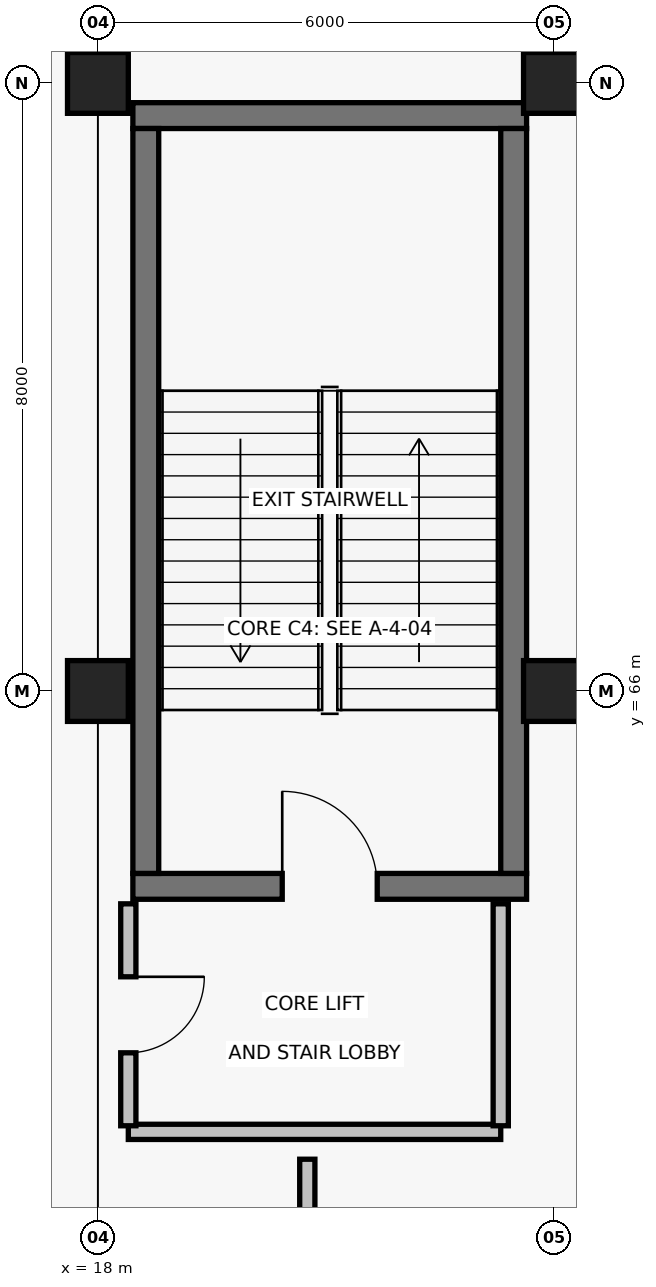
"""IFC4 building model, lengths in metres.
Left out: names, types, materials, properties, quantities, classifications, styles, units other than length and angle.
Written with IfcOpenShell. Run it as: python <this file> out.ifc"""

import sys

from ifc_helpers import new_model, si_unit, direction, frame, frame_2d, origin, origin_2d, place, context, subcontext, project, spatial, rectangle, extrude, element, fill, save


model = new_model("IFC4")
c1 = context("Model", 3, precision=1e-05, world=origin(), true_north=direction((0.0, 1.0)))
c2 = subcontext(c1, "Body", "Model", "MODEL_VIEW")
j1 = project(units=[si_unit("LENGTHUNIT", "METRE"), si_unit("PLANEANGLEUNIT", "RADIAN")], contexts=[c1])
p1 = place(None, origin())
s1 = spatial("IfcSite", under=j1, at=p1, CompositionType="ELEMENT")
p2 = place(p1, origin())
s2 = spatial("IfcBuilding", under=s1, at=p2, CompositionType="ELEMENT")
p3 = place(p2, frame((0.0, 0.0, -10.4)))
s3 = spatial("IfcBuildingStorey", under=s2, at=p3, CompositionType="ELEMENT", Elevation=-10.4)
for number, where, z_axis, x_axis in (
    (1, (18.0, 66.0, 0.0), (0.0, 0.0, 1.0), (1.0, 0.0, 0.0)),
    (2, (18.0, 74.0, 0.0), (0.0, 0.0, 1.0), (1.0, 0.0, 0.0)),
    (3, (24.0, 66.0, 0.0), (0.0, 0.0, 1.0), (1.0, 0.0, 0.0)),
    (4, (24.0, 74.0, 0.0), (0.0, 0.0, 1.0), (1.0, 0.0, 0.0)),
):
    element("IfcColumn", number, at=place(p3, frame(where, z_axis=z_axis, x_axis=x_axis)), inside=s3, PredefinedType="COLUMN", context=c2, shape_type="SweptSolid", body=[
        extrude(rectangle(XDim=0.8, YDim=0.8, at=origin_2d()), origin(), (0.0, 0.0, 1.0), 5.6),
    ])
p4 = place(p3, frame((18.46, 63.43, 0.0), z_axis=(0.0, 0.0, 1.0), x_axis=(1.0, 0.0, 0.0)))
e5 = element("IfcWall", 5, at=p4, inside=s3, PredefinedType="SHEAR", context=c2, shape_type="SweptSolid", body=[
    extrude(rectangle(XDim=5.18, YDim=0.34, at=frame_2d((2.59, 0.0))), origin(), (0.0, 0.0, 1.0), 5.15),
])
p5 = place(p4, frame((1.965, 0.0, 0.0)))
e6 = element("IfcOpeningElement", 6, at=p5, cuts=e5, PredefinedType="OPENING", context=c2, shape_type="SweptSolid", body=[
    extrude(rectangle(XDim=1.25, YDim=2.2, at=frame_2d((0.625, 1.1))), frame((0.0, 0.185, 0.0), z_axis=(0.0, -1.0, 0.0), x_axis=(1.0, 0.0, 0.0)), (0.0, 0.0, 1.0), 0.37),
])
p6 = place(p3, frame((23.64, 73.57, 0.0), z_axis=(0.0, 0.0, 1.0), x_axis=(-1.0, 0.0, 0.0)))
e7 = element("IfcWall", 7, at=p6, inside=s3, PredefinedType="SHEAR", context=c2, shape_type="SweptSolid", body=[
    extrude(rectangle(XDim=5.18, YDim=0.34, at=frame_2d((2.59, 0.0))), origin(), (0.0, 0.0, 1.0), 5.15),
])
for number, where, z_axis, x_axis in (
    (8, (18.63, 73.4, 0.0), (0.0, 0.0, 1.0), (0.0, -1.0, 0.0)),
    (9, (23.47, 63.6, 0.0), (0.0, 0.0, 1.0), (0.0, 1.0, 0.0)),
):
    element("IfcWall", number, at=place(p3, frame(where, z_axis=z_axis, x_axis=x_axis)), inside=s3, PredefinedType="SHEAR", context=c2, shape_type="SweptSolid", body=[
        extrude(rectangle(XDim=9.8, YDim=0.34, at=frame_2d((4.9, 0.0))), origin(), (0.0, 0.0, 1.0), 5.15),
    ])
p7 = place(p3, frame((18.4, 60.2, 0.0), z_axis=(0.0, 0.0, 1.0), x_axis=(1.0, 0.0, 0.0)))
e10 = element("IfcWall", 10, at=p7, inside=s3, PredefinedType="PARTITIONING", context=c2, shape_type="SweptSolid", body=[
    extrude(rectangle(XDim=4.9, YDim=0.2, at=frame_2d((2.45, 0.0))), origin(), (0.0, 0.0, 1.0), 4.68),
])
p8 = place(p3, frame((18.4, 63.2, 0.0), z_axis=(0.0, 0.0, 1.0), x_axis=(0.0, -1.0, 0.0)))
e11 = element("IfcWall", 11, at=p8, inside=s3, PredefinedType="PARTITIONING", context=c2, shape_type="SweptSolid", body=[
    extrude(rectangle(XDim=2.92, YDim=0.2, at=frame_2d((1.46, 0.0))), origin(), (0.0, 0.0, 1.0), 4.68),
])
p9 = place(p8, frame((0.96, 0.0, 0.0)))
e12 = element("IfcOpeningElement", 12, at=p9, cuts=e11, PredefinedType="OPENING", context=c2, shape_type="SweptSolid", body=[
    extrude(rectangle(XDim=1.0, YDim=2.15, at=frame_2d((0.5, 1.075))), frame((0.0, 0.115, 0.0), z_axis=(0.0, -1.0, 0.0), x_axis=(1.0, 0.0, 0.0)), (0.0, 0.0, 1.0), 0.23),
])
p10 = place(p3, frame((23.3, 60.28, 0.0), z_axis=(0.0, 0.0, 1.0), x_axis=(0.0, 1.0, 0.0)))
e13 = element("IfcWall", 13, at=p10, inside=s3, PredefinedType="PARTITIONING", context=c2, shape_type="SweptSolid", body=[
    extrude(rectangle(XDim=2.92, YDim=0.2, at=frame_2d((1.46, 0.0))), origin(), (0.0, 0.0, 1.0), 5.15),
])
p11 = place(p3, frame((20.755, 59.84, 0.0), z_axis=(0.0, 0.0, 1.0), x_axis=(0.0, -1.0, 0.0)))
e14 = element("IfcWall", 14, at=p11, inside=s3, PredefinedType="PARTITIONING", context=c2, shape_type="SweptSolid", body=[
    extrude(rectangle(XDim=3.56, YDim=0.2, at=frame_2d((1.78, 0.0))), origin(), (0.0, 0.0, 1.0), 4.68),
])
p12 = place(p11, frame((1.12, 0.0, 0.0)))
e15 = element("IfcOpeningElement", 15, at=p12, cuts=e14, PredefinedType="OPENING", context=c2, shape_type="SweptSolid", body=[
    extrude(rectangle(XDim=1.32, YDim=2.2, at=frame_2d((0.66, 1.1))), frame((0.0, 0.115, 0.0), z_axis=(0.0, -1.0, 0.0), x_axis=(1.0, 0.0, 0.0)), (0.0, 0.0, 1.0), 0.23),
])
p13 = place(p5, origin())
e16 = element("IfcDoor", 16, at=p13, inside=s3, OperationType="SINGLE_SWING_LEFT", PredefinedType="DOOR", context=c2, shape_type="SweptSolid", body=[
    extrude(rectangle(XDim=1.25, YDim=2.2, at=frame_2d((0.625, 1.1))), frame((0.0, 0.025, 0.0), z_axis=(0.0, -1.0, 0.0), x_axis=(1.0, 0.0, 0.0)), (0.0, 0.0, 1.0), 0.05),
])
fill(e6, e16)
p14 = place(p9, origin())
e17 = element("IfcDoor", 17, at=p14, inside=s3, OperationType="SINGLE_SWING_LEFT", PredefinedType="DOOR", context=c2, shape_type="SweptSolid", body=[
    extrude(rectangle(XDim=1.0, YDim=2.15, at=frame_2d((0.5, 1.075))), frame((0.0, 0.025, 0.0), z_axis=(0.0, -1.0, 0.0), x_axis=(1.0, 0.0, 0.0)), (0.0, 0.0, 1.0), 0.05),
])
fill(e12, e17)
save(model, sys.argv[1])
